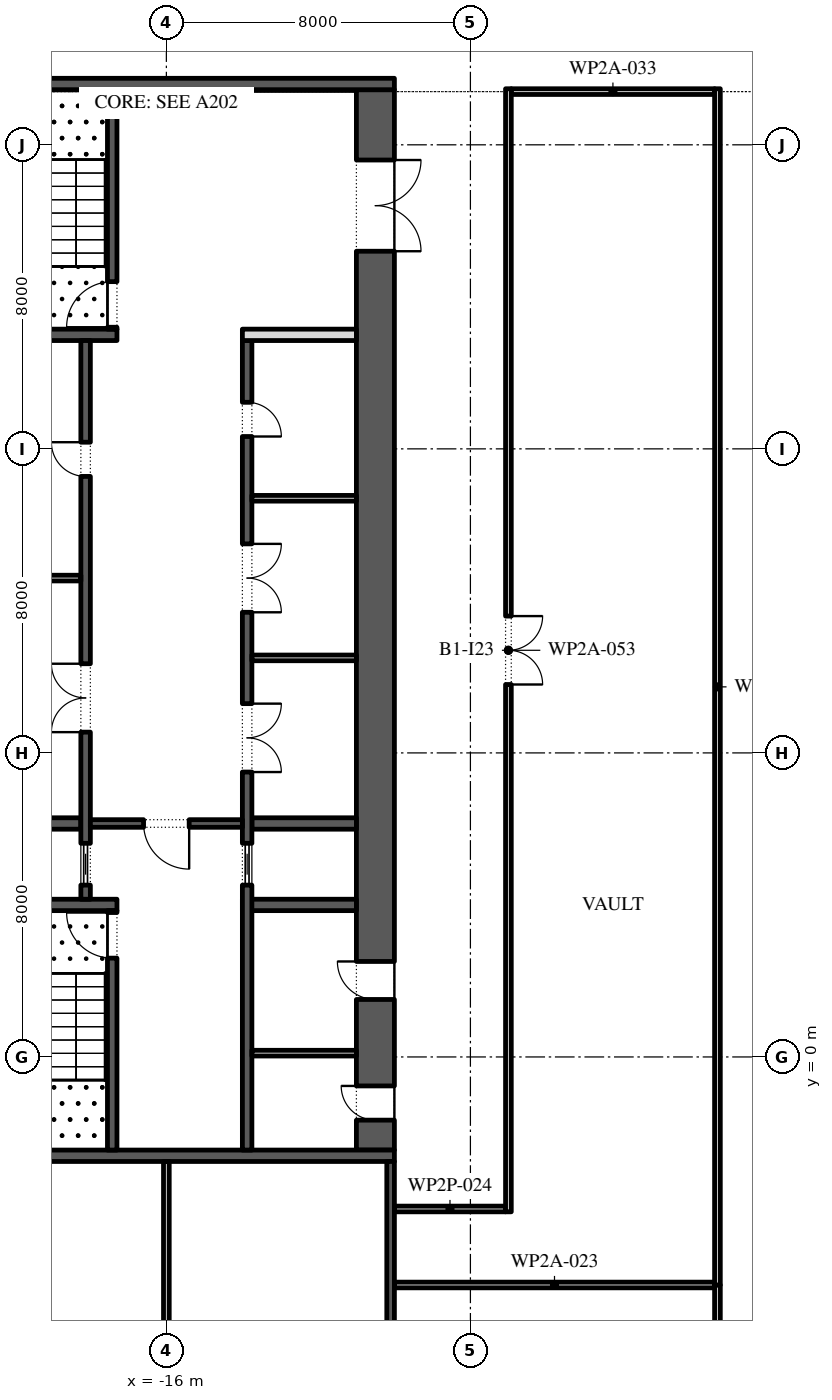
"""IFC4 building model, lengths in metres.
Left out: names, types, materials, properties, quantities, classifications, styles, units other than length and angle.
Written with IfcOpenShell. Run it as: python <this file> out.ifc"""

import sys

from ifc_helpers import new_model, si_unit, direction, frame, frame_2d, origin, place, context, subcontext, project, spatial, rectangle, extrude, element, fill, save


model = new_model("IFC4")
c1 = context("Model", 3, precision=1e-05, world=origin(), true_north=direction((0.0, 1.0)))
c2 = subcontext(c1, "Body", "Model", "MODEL_VIEW")
j1 = project(units=[si_unit("LENGTHUNIT", "METRE"), si_unit("PLANEANGLEUNIT", "RADIAN")], contexts=[c1])
p1 = place(None, origin())
s1 = spatial("IfcSite", under=j1, at=p1, CompositionType="ELEMENT")
p2 = place(p1, origin())
s2 = spatial("IfcBuilding", under=s1, at=p2, CompositionType="ELEMENT")
p3 = place(p2, frame((0.0, 0.0, -5.2)))
s3 = spatial("IfcBuildingStorey", under=s2, at=p3, CompositionType="ELEMENT", Elevation=-5.2)
p4 = place(p3, frame((-10.5, -2.45, 0.0), z_axis=(0.0, 0.0, 1.0), x_axis=(0.0, 1.0, 0.0)))
e1 = element("IfcWall", 1, at=p4, inside=s3, PredefinedType="SHEAR", context=c2, shape_type="SweptSolid", body=[
    extrude(rectangle(XDim=27.9, YDim=1.0, at=frame_2d((13.95, 0.0))), origin(), (0.0, 0.0, 1.0), 4.9),
])
p5 = place(p4, frame((23.65, 0.0, 0.0)))
e2 = element("IfcOpeningElement", 2, at=p5, cuts=e1, PredefinedType="OPENING", context=c2, shape_type="SweptSolid", body=[
    extrude(rectangle(XDim=2.4, YDim=2.1, at=frame_2d((1.2, 1.05))), frame((0.0, 0.51, 0.0), z_axis=(0.0, -1.0, 0.0), x_axis=(1.0, 0.0, 0.0)), (0.0, 0.0, 1.0), 1.02),
])
p6 = place(p4, frame((0.788, 0.0, 0.0)))
e3 = element("IfcOpeningElement", 3, at=p6, cuts=e1, PredefinedType="OPENING", context=c2, shape_type="SweptSolid", body=[
    extrude(rectangle(XDim=0.9, YDim=2.1, at=frame_2d((0.45, 1.05))), frame((0.0, 0.51, 0.0), z_axis=(0.0, -1.0, 0.0), x_axis=(1.0, 0.0, 0.0)), (0.0, 0.0, 1.0), 1.02),
])
p7 = place(p4, frame((3.962, 0.0, 0.0)))
e4 = element("IfcOpeningElement", 4, at=p7, cuts=e1, PredefinedType="OPENING", context=c2, shape_type="SweptSolid", body=[
    extrude(rectangle(XDim=1.0, YDim=2.1, at=frame_2d((0.5, 1.05))), frame((0.0, 0.51, 0.0), z_axis=(0.0, -1.0, 0.0), x_axis=(1.0, 0.0, 0.0)), (0.0, 0.0, 1.0), 1.02),
])
for number, where, z_axis, x_axis in (
    (5, (-22.0, -2.6, 0.0), (0.0, 0.0, 1.0), (1.0, 0.0, 0.0)),
    (6, (-22.0, 25.6, 0.0), (0.0, 0.0, 1.0), (1.0, 0.0, 0.0)),
):
    element("IfcWall", number, at=place(p3, frame(where, z_axis=z_axis, x_axis=x_axis)), inside=s3, PredefinedType="SHEAR", context=c2, shape_type="SweptSolid", body=[
        extrude(rectangle(XDim=12.0, YDim=0.3, at=frame_2d((6.0, 0.0))), origin(), (0.0, 0.0, 1.0), 4.9),
    ])
p8 = place(p3, frame((-21.0, 4.0, 0.0), z_axis=(0.0, 0.0, 1.0), x_axis=(1.0, 0.0, 0.0)))
e7 = element("IfcWall", 7, at=p8, inside=s3, PredefinedType="SHEAR", context=c2, shape_type="SweptSolid", body=[
    extrude(rectangle(XDim=3.7, YDim=0.3, at=frame_2d((1.85, 0.0))), origin(), (0.0, 0.0, 1.0), 4.9),
])
p9 = place(p3, frame((-17.425, -2.45, 0.0), z_axis=(0.0, 0.0, 1.0), x_axis=(0.0, 1.0, 0.0)))
e8 = element("IfcWall", 8, at=p9, inside=s3, PredefinedType="SHEAR", context=c2, shape_type="SweptSolid", body=[
    extrude(rectangle(XDim=6.3, YDim=0.25, at=frame_2d((3.15, 0.0))), origin(), (0.0, 0.0, 1.0), 4.9),
])
p10 = place(p9, frame((5.05, 0.0, 0.0)))
e9 = element("IfcOpeningElement", 9, at=p10, cuts=e8, PredefinedType="OPENING", context=c2, shape_type="SweptSolid", body=[
    extrude(rectangle(XDim=1.2, YDim=2.1, at=frame_2d((0.6, 1.05))), frame((0.0, 0.135, 0.0), z_axis=(0.0, -1.0, 0.0), x_axis=(1.0, 0.0, 0.0)), (0.0, 0.0, 1.0), 0.27),
])
p11 = place(p3, frame((-21.0, 19.0, 0.0), z_axis=(0.0, 0.0, 1.0), x_axis=(1.0, 0.0, 0.0)))
e10 = element("IfcWall", 10, at=p11, inside=s3, PredefinedType="SHEAR", context=c2, shape_type="SweptSolid", body=[
    extrude(rectangle(XDim=3.7, YDim=0.3, at=frame_2d((1.85, 0.0))), origin(), (0.0, 0.0, 1.0), 4.9),
])
p12 = place(p3, frame((-17.425, 19.15, 0.0), z_axis=(0.0, 0.0, 1.0), x_axis=(0.0, 1.0, 0.0)))
e11 = element("IfcWall", 11, at=p12, inside=s3, PredefinedType="SHEAR", context=c2, shape_type="SweptSolid", body=[
    extrude(rectangle(XDim=6.3, YDim=0.25, at=frame_2d((3.15, 0.0))), origin(), (0.0, 0.0, 1.0), 4.9),
])
p13 = place(p12, frame((0.05, 0.0, 0.0)))
e12 = element("IfcOpeningElement", 12, at=p13, cuts=e11, PredefinedType="OPENING", context=c2, shape_type="SweptSolid", body=[
    extrude(rectangle(XDim=1.2, YDim=2.1, at=frame_2d((0.6, 1.05))), frame((0.0, 0.135, 0.0), z_axis=(0.0, -1.0, 0.0), x_axis=(1.0, 0.0, 0.0)), (0.0, 0.0, 1.0), 0.27),
])
p14 = place(p3, frame((-21.0, 6.143, 0.0), z_axis=(0.0, 0.0, 1.0), x_axis=(1.0, 0.0, 0.0)))
e13 = element("IfcWall", 13, at=p14, inside=s3, PredefinedType="SHEAR", context=c2, shape_type="SweptSolid", body=[
    extrude(rectangle(XDim=2.75, YDim=0.3, at=frame_2d((1.375, 0.0))), origin(), (0.0, 0.0, 1.0), 4.9),
])
p15 = place(p3, frame((-18.125, 4.15, 0.0), z_axis=(0.0, 0.0, 1.0), x_axis=(0.0, 1.0, 0.0)))
e14 = element("IfcWall", 14, at=p15, inside=s3, PredefinedType="SHEAR", context=c2, shape_type="SweptSolid", body=[
    extrude(rectangle(XDim=14.7, YDim=0.25, at=frame_2d((7.35, 0.0))), origin(), (0.0, 0.0, 1.0), 4.9),
])
p16 = place(p15, frame((4.396, 0.0, 0.0)))
e15 = element("IfcOpeningElement", 15, at=p16, cuts=e14, PredefinedType="OPENING", context=c2, shape_type="SweptSolid", body=[
    extrude(rectangle(XDim=1.8, YDim=2.4, at=frame_2d((0.9, 1.2))), frame((0.0, 0.135, 0.0), z_axis=(0.0, -1.0, 0.0), x_axis=(1.0, 0.0, 0.0)), (0.0, 0.0, 1.0), 0.27),
])
p17 = place(p15, frame((11.125, 0.0, 0.0)))
e16 = element("IfcOpeningElement", 16, at=p17, cuts=e14, PredefinedType="OPENING", context=c2, shape_type="SweptSolid", body=[
    extrude(rectangle(XDim=0.9, YDim=2.1, at=frame_2d((0.45, 1.05))), frame((0.0, 0.135, 0.0), z_axis=(0.0, -1.0, 0.0), x_axis=(1.0, 0.0, 0.0)), (0.0, 0.0, 1.0), 0.27),
])
p18 = place(p15, frame((0.371, 0.0, 0.0)))
e17 = element("IfcOpeningElement", 17, at=p18, cuts=e14, PredefinedType="OPENING", context=c2, shape_type="SweptSolid", body=[
    extrude(rectangle(XDim=1.1, YDim=2.1, at=frame_2d((0.55, 1.05))), frame((0.0, 0.135, 0.0), z_axis=(0.0, -1.0, 0.0), x_axis=(1.0, 0.0, 0.0)), (0.0, 0.0, 1.0), 0.27),
])
p19 = place(p3, frame((-21.0, 12.6, 0.0), z_axis=(0.0, 0.0, 1.0), x_axis=(1.0, 0.0, 0.0)))
e18 = element("IfcWall", 18, at=p19, inside=s3, PredefinedType="PARTITIONING", context=c2, shape_type="SweptSolid", body=[
    extrude(rectangle(XDim=2.75, YDim=0.15, at=frame_2d((1.375, 0.0))), origin(), (0.0, 0.0, 1.0), 4.9),
])
p20 = place(p3, frame((-14.0, 4.0, 0.0), z_axis=(0.0, 0.0, 1.0), x_axis=(1.0, 0.0, 0.0)))
e19 = element("IfcWall", 19, at=p20, inside=s3, PredefinedType="SHEAR", context=c2, shape_type="SweptSolid", body=[
    extrude(rectangle(XDim=3.0, YDim=0.3, at=frame_2d((1.5, 0.0))), origin(), (0.0, 0.0, 1.0), 4.9),
])
p21 = place(p3, frame((-13.75, 6.143, 0.0), z_axis=(0.0, 0.0, 1.0), x_axis=(1.0, 0.0, 0.0)))
e20 = element("IfcWall", 20, at=p21, inside=s3, PredefinedType="SHEAR", context=c2, shape_type="SweptSolid", body=[
    extrude(rectangle(XDim=2.75, YDim=0.3, at=frame_2d((1.375, 0.0))), origin(), (0.0, 0.0, 1.0), 4.9),
])
p22 = place(p3, frame((-13.875, -2.45, 0.0), z_axis=(0.0, 0.0, 1.0), x_axis=(0.0, 1.0, 0.0)))
e21 = element("IfcWall", 21, at=p22, inside=s3, PredefinedType="SHEAR", context=c2, shape_type="SweptSolid", body=[
    extrude(rectangle(XDim=21.3, YDim=0.25, at=frame_2d((10.65, 0.0))), origin(), (0.0, 0.0, 1.0), 4.9),
])
p23 = place(p22, frame((9.946, 0.0, 0.0)))
e22 = element("IfcOpeningElement", 22, at=p23, cuts=e21, PredefinedType="OPENING", context=c2, shape_type="SweptSolid", body=[
    extrude(rectangle(XDim=1.8, YDim=2.4, at=frame_2d((0.9, 1.2))), frame((0.0, 0.135, 0.0), z_axis=(0.0, -1.0, 0.0), x_axis=(1.0, 0.0, 0.0)), (0.0, 0.0, 1.0), 0.27),
])
p24 = place(p22, frame((14.15, 0.0, 0.0)))
e23 = element("IfcOpeningElement", 23, at=p24, cuts=e21, PredefinedType="OPENING", context=c2, shape_type="SweptSolid", body=[
    extrude(rectangle(XDim=1.8, YDim=2.4, at=frame_2d((0.9, 1.2))), frame((0.0, 0.135, 0.0), z_axis=(0.0, -1.0, 0.0), x_axis=(1.0, 0.0, 0.0)), (0.0, 0.0, 1.0), 0.27),
])
p25 = place(p22, frame((18.775, 0.0, 0.0)))
e24 = element("IfcOpeningElement", 24, at=p25, cuts=e21, PredefinedType="OPENING", context=c2, shape_type="SweptSolid", body=[
    extrude(rectangle(XDim=0.9, YDim=2.1, at=frame_2d((0.45, 1.05))), frame((0.0, 0.135, 0.0), z_axis=(0.0, -1.0, 0.0), x_axis=(1.0, 0.0, 0.0)), (0.0, 0.0, 1.0), 0.27),
])
p26 = place(p22, frame((6.971, 0.0, 0.0)))
e25 = element("IfcOpeningElement", 25, at=p26, cuts=e21, PredefinedType="OPENING", context=c2, shape_type="SweptSolid", body=[
    extrude(rectangle(XDim=1.1, YDim=2.1, at=frame_2d((0.55, 1.05))), frame((0.0, 0.135, 0.0), z_axis=(0.0, -1.0, 0.0), x_axis=(1.0, 0.0, 0.0)), (0.0, 0.0, 1.0), 0.27),
])
p27 = place(p3, frame((-14.0, 19.0, 0.0), z_axis=(0.0, 0.0, 1.0), x_axis=(1.0, 0.0, 0.0)))
e26 = element("IfcWall", 26, at=p27, inside=s3, PredefinedType="PARTITIONING", context=c2, shape_type="SweptSolid", body=[
    extrude(rectangle(XDim=3.0, YDim=0.3, at=frame_2d((1.5, 0.0))), origin(), (0.0, 0.0, 1.0), 4.9),
])
for number, where, z_axis, x_axis in (
    (27, (-13.75, 10.5, 0.0), (0.0, 0.0, 1.0), (1.0, 0.0, 0.0)),
    (28, (-13.75, 14.7, 0.0), (0.0, 0.0, 1.0), (1.0, 0.0, 0.0)),
):
    element("IfcWall", number, at=place(p3, frame(where, z_axis=z_axis, x_axis=x_axis)), inside=s3, PredefinedType="PARTITIONING", context=c2, shape_type="SweptSolid", body=[
        extrude(rectangle(XDim=2.75, YDim=0.15, at=frame_2d((1.375, 0.0))), origin(), (0.0, 0.0, 1.0), 4.9),
    ])
p28 = place(p3, frame((-18.0, 6.143, 0.0), z_axis=(0.0, 0.0, 1.0), x_axis=(1.0, 0.0, 0.0)))
e29 = element("IfcWall", 29, at=p28, inside=s3, PredefinedType="SHEAR", context=c2, shape_type="SweptSolid", body=[
    extrude(rectangle(XDim=4.0, YDim=0.2, at=frame_2d((2.0, 0.0))), origin(), (0.0, 0.0, 1.0), 4.9),
])
p29 = place(p28, frame((1.4, 0.0, 0.0)))
e30 = element("IfcOpeningElement", 30, at=p29, cuts=e29, PredefinedType="OPENING", context=c2, shape_type="SweptSolid", body=[
    extrude(rectangle(XDim=1.2, YDim=2.1, at=frame_2d((0.6, 1.05))), frame((0.0, 0.11, 0.0), z_axis=(0.0, -1.0, 0.0), x_axis=(1.0, 0.0, 0.0)), (0.0, 0.0, 1.0), 0.22),
])
p30 = place(p3, frame((-13.75, 0.1, 0.0), z_axis=(0.0, 0.0, 1.0), x_axis=(1.0, 0.0, 0.0)))
e31 = element("IfcWall", 31, at=p30, inside=s3, PredefinedType="PARTITIONING", context=c2, shape_type="SweptSolid", body=[
    extrude(rectangle(XDim=2.75, YDim=0.15, at=frame_2d((1.375, 0.0))), origin(), (0.0, 0.0, 1.0), 4.9),
])
p31 = place(p3, frame((-10.1, -15.8, 0.0), z_axis=(0.0, 0.0, 1.0), x_axis=(0.0, 1.0, 0.0)))
e32 = element("IfcWall", 32, at=p31, inside=s3, PredefinedType="SHEAR", context=c2, shape_type="SweptSolid", body=[
    extrude(rectangle(XDim=13.05, YDim=0.2, at=frame_2d((6.525, 0.0))), origin(), (0.0, 0.0, 1.0), 4.9),
])
p32 = place(p31, frame((5.625, 0.0, 0.0)))
e33 = element("IfcOpeningElement", 33, at=p32, cuts=e32, PredefinedType="OPENING", context=c2, shape_type="SweptSolid", body=[
    extrude(rectangle(XDim=1.8, YDim=2.4, at=frame_2d((0.9, 1.2))), frame((0.0, 0.11, 0.0), z_axis=(0.0, -1.0, 0.0), x_axis=(1.0, 0.0, 0.0)), (0.0, 0.0, 1.0), 0.22),
])
p33 = place(p3, frame((-16.0, -15.8, 0.0), z_axis=(0.0, 0.0, 1.0), x_axis=(0.0, 1.0, 0.0)))
e34 = element("IfcWall", 34, at=p33, inside=s3, PredefinedType="PARTITIONING", context=c2, shape_type="SweptSolid", body=[
    extrude(rectangle(XDim=13.05, YDim=0.15, at=frame_2d((6.525, 0.0))), origin(), (0.0, 0.0, 1.0), 4.9),
])
p34 = place(p3, frame((-10.0, -6.0, 0.0), z_axis=(0.0, 0.0, 1.0), x_axis=(1.0, 0.0, 0.0)))
e35 = element("IfcWall", 35, at=p34, inside=s3, PredefinedType="PARTITIONING", context=c2, shape_type="SweptSolid", body=[
    extrude(rectangle(XDim=8.425, YDim=0.15, at=frame_2d((4.212, 0.0))), origin(), (0.0, 0.0, 1.0), 4.9),
])
p35 = place(p3, frame((-10.0, -4.0, 0.0), z_axis=(0.0, 0.0, 1.0), x_axis=(1.0, 0.0, 0.0)))
e36 = element("IfcWall", 36, at=p35, inside=s3, PredefinedType="PARTITIONING", context=c2, shape_type="SweptSolid", body=[
    extrude(rectangle(XDim=2.925, YDim=0.15, at=frame_2d((1.462, 0.0))), origin(), (0.0, 0.0, 1.0), 3.93),
])
p36 = place(p3, frame((-6.925, 25.4, 0.0), z_axis=(0.0, 0.0, 1.0), x_axis=(1.0, 0.0, 0.0)))
e37 = element("IfcWall", 37, at=p36, inside=s3, PredefinedType="PARTITIONING", context=c2, shape_type="SweptSolid", body=[
    extrude(rectangle(XDim=5.35, YDim=0.15, at=frame_2d((2.675, 0.0))), origin(), (0.0, 0.0, 1.0), 4.9),
])
p37 = place(p3, frame((-7.0, -4.075, 0.0), z_axis=(0.0, 0.0, 1.0), x_axis=(0.0, 1.0, 0.0)))
e38 = element("IfcWall", 38, at=p37, inside=s3, PredefinedType="PARTITIONING", context=c2, shape_type="SweptSolid", body=[
    extrude(rectangle(XDim=29.55, YDim=0.15, at=frame_2d((14.775, 0.0))), origin(), (0.0, 0.0, 1.0), 4.9),
])
p38 = place(p37, frame((13.875, 0.0, 0.0)))
e39 = element("IfcOpeningElement", 39, at=p38, cuts=e38, PredefinedType="OPENING", context=c2, shape_type="SweptSolid", body=[
    extrude(rectangle(XDim=1.8, YDim=2.1, at=frame_2d((0.9, 1.05))), frame((0.0, 0.085, 0.0), z_axis=(0.0, -1.0, 0.0), x_axis=(1.0, 0.0, 0.0)), (0.0, 0.0, 1.0), 0.17),
])
p39 = place(p3, frame((-1.5, -19.0, 0.0), z_axis=(0.0, 0.0, 1.0), x_axis=(0.0, 1.0, 0.0)))
e40 = element("IfcWall", 40, at=p39, inside=s3, PredefinedType="PARTITIONING", context=c2, shape_type="SweptSolid", body=[
    extrude(rectangle(XDim=13.0, YDim=0.15, at=frame_2d((6.5, 0.0))), origin(), (0.0, 0.0, 1.0), 4.9),
])
p40 = place(p39, frame((6.0, 0.0, 0.0)))
e41 = element("IfcOpeningElement", 41, at=p40, cuts=e40, PredefinedType="OPENING", context=c2, shape_type="SweptSolid", body=[
    extrude(rectangle(XDim=1.0, YDim=2.1, at=frame_2d((0.5, 1.05))), frame((0.0, 0.085, 0.0), z_axis=(0.0, -1.0, 0.0), x_axis=(1.0, 0.0, 0.0)), (0.0, 0.0, 1.0), 0.17),
])
p41 = place(p3, frame((-1.5, -6.0, 0.0), z_axis=(0.0, 0.0, 1.0), x_axis=(0.0, 1.0, 0.0)))
e42 = element("IfcWall", 42, at=p41, inside=s3, PredefinedType="PARTITIONING", context=c2, shape_type="SweptSolid", body=[
    extrude(rectangle(XDim=31.475, YDim=0.15, at=frame_2d((15.738, 0.0))), origin(), (0.0, 0.0, 1.0), 4.9),
])
p42 = place(p16, origin())
e43 = element("IfcDoor", 43, at=p42, inside=s3, OperationType="DOUBLE_DOOR_SINGLE_SWING", PredefinedType="DOOR", context=c2, shape_type="SweptSolid", body=[
    extrude(rectangle(XDim=1.8, YDim=2.4, at=frame_2d((0.9, 1.2))), frame((0.0, 0.125, 0.0), z_axis=(0.0, -1.0, 0.0), x_axis=(1.0, 0.0, 0.0)), (0.0, 0.0, 1.0), 0.05),
])
fill(e15, e43)
p43 = place(p17, origin())
e44 = element("IfcDoor", 44, at=p43, inside=s3, OperationType="SINGLE_SWING_LEFT", PredefinedType="DOOR", context=c2, shape_type="SweptSolid", body=[
    extrude(rectangle(XDim=0.9, YDim=2.1, at=frame_2d((0.45, 1.05))), frame((0.0, 0.125, 0.0), z_axis=(0.0, -1.0, 0.0), x_axis=(1.0, 0.0, 0.0)), (0.0, 0.0, 1.0), 0.05),
])
fill(e16, e44)
p44 = place(p18, origin())
e45 = element("IfcDoor", 45, at=p44, inside=s3, OperationType="SLIDING_TO_LEFT", PredefinedType="DOOR", context=c2, shape_type="SweptSolid", body=[
    extrude(rectangle(XDim=1.1, YDim=2.1, at=frame_2d((0.55, 1.05))), frame((0.0, 0.025, 0.0), z_axis=(0.0, -1.0, 0.0), x_axis=(1.0, 0.0, 0.0)), (0.0, 0.0, 1.0), 0.05),
])
fill(e17, e45)
p45 = place(p23, frame((1.8, -0.2, 0.0), z_axis=(0.0, 0.0, 1.0), x_axis=(-1.0, 0.0, 0.0)))
e46 = element("IfcDoor", 46, at=p45, inside=s3, OperationType="DOUBLE_DOOR_SINGLE_SWING", PredefinedType="DOOR", context=c2, shape_type="SweptSolid", body=[
    extrude(rectangle(XDim=1.8, YDim=2.4, at=frame_2d((0.9, 1.2))), frame((0.0, -0.075, 0.0), z_axis=(0.0, -1.0, 0.0), x_axis=(1.0, 0.0, 0.0)), (0.0, 0.0, 1.0), 0.05),
])
fill(e22, e46)
p46 = place(p24, frame((1.8, -0.2, 0.0), z_axis=(0.0, 0.0, 1.0), x_axis=(-1.0, 0.0, 0.0)))
e47 = element("IfcDoor", 47, at=p46, inside=s3, OperationType="DOUBLE_DOOR_SINGLE_SWING", PredefinedType="DOOR", context=c2, shape_type="SweptSolid", body=[
    extrude(rectangle(XDim=1.8, YDim=2.4, at=frame_2d((0.9, 1.2))), frame((0.0, -0.075, 0.0), z_axis=(0.0, -1.0, 0.0), x_axis=(1.0, 0.0, 0.0)), (0.0, 0.0, 1.0), 0.05),
])
fill(e23, e47)
p47 = place(p25, frame((0.9, -0.2, 0.0), z_axis=(0.0, 0.0, 1.0), x_axis=(-1.0, 0.0, 0.0)))
e48 = element("IfcDoor", 48, at=p47, inside=s3, OperationType="SINGLE_SWING_LEFT", PredefinedType="DOOR", context=c2, shape_type="SweptSolid", body=[
    extrude(rectangle(XDim=0.9, YDim=2.1, at=frame_2d((0.45, 1.05))), frame((0.0, -0.075, 0.0), z_axis=(0.0, -1.0, 0.0), x_axis=(1.0, 0.0, 0.0)), (0.0, 0.0, 1.0), 0.05),
])
fill(e24, e48)
p48 = place(p26, origin())
e49 = element("IfcDoor", 49, at=p48, inside=s3, OperationType="SLIDING_TO_LEFT", PredefinedType="DOOR", context=c2, shape_type="SweptSolid", body=[
    extrude(rectangle(XDim=1.1, YDim=2.1, at=frame_2d((0.55, 1.05))), frame((0.0, 0.025, 0.0), z_axis=(0.0, -1.0, 0.0), x_axis=(1.0, 0.0, 0.0)), (0.0, 0.0, 1.0), 0.05),
])
fill(e25, e49)
p49 = place(p29, frame((1.2, 0.0, 0.0), z_axis=(0.0, 0.0, 1.0), x_axis=(-1.0, 0.0, 0.0)))
e50 = element("IfcDoor", 50, at=p49, inside=s3, OperationType="SINGLE_SWING_RIGHT", PredefinedType="DOOR", context=c2, shape_type="SweptSolid", body=[
    extrude(rectangle(XDim=1.2, YDim=2.1, at=frame_2d((0.6, 1.05))), frame((0.0, 0.025, 0.0), z_axis=(0.0, -1.0, 0.0), x_axis=(1.0, 0.0, 0.0)), (0.0, 0.0, 1.0), 0.05),
])
fill(e30, e50)
p50 = place(p5, frame((2.4, 0.0, 0.0), z_axis=(0.0, 0.0, 1.0), x_axis=(-1.0, 0.0, 0.0)))
e51 = element("IfcDoor", 51, at=p50, inside=s3, OperationType="DOUBLE_DOOR_SINGLE_SWING", PredefinedType="DOOR", context=c2, shape_type="SweptSolid", body=[
    extrude(rectangle(XDim=2.4, YDim=2.1, at=frame_2d((1.2, 1.05))), frame((0.0, 0.025, 0.0), z_axis=(0.0, -1.0, 0.0), x_axis=(1.0, 0.0, 0.0)), (0.0, 0.0, 1.0), 0.05),
])
fill(e2, e51)
p51 = place(p10, origin())
e52 = element("IfcDoor", 52, at=p51, inside=s3, OperationType="SINGLE_SWING_LEFT", PredefinedType="DOOR", context=c2, shape_type="SweptSolid", body=[
    extrude(rectangle(XDim=1.2, YDim=2.1, at=frame_2d((0.6, 1.05))), frame((0.0, 0.025, 0.0), z_axis=(0.0, -1.0, 0.0), x_axis=(1.0, 0.0, 0.0)), (0.0, 0.0, 1.0), 0.05),
])
fill(e9, e52)
p52 = place(p13, origin())
e53 = element("IfcDoor", 53, at=p52, inside=s3, OperationType="SINGLE_SWING_RIGHT", PredefinedType="DOOR", context=c2, shape_type="SweptSolid", body=[
    extrude(rectangle(XDim=1.2, YDim=2.1, at=frame_2d((0.6, 1.05))), frame((0.0, 0.025, 0.0), z_axis=(0.0, -1.0, 0.0), x_axis=(1.0, 0.0, 0.0)), (0.0, 0.0, 1.0), 0.05),
])
fill(e12, e53)
p53 = place(p6, origin())
e54 = element("IfcDoor", 54, at=p53, inside=s3, OperationType="SINGLE_SWING_LEFT", PredefinedType="DOOR", context=c2, shape_type="SweptSolid", body=[
    extrude(rectangle(XDim=0.9, YDim=2.1, at=frame_2d((0.45, 1.05))), frame((0.0, 0.5, 0.0), z_axis=(0.0, -1.0, 0.0), x_axis=(1.0, 0.0, 0.0)), (0.0, 0.0, 1.0), 0.05),
])
fill(e3, e54)
p54 = place(p7, origin())
e55 = element("IfcDoor", 55, at=p54, inside=s3, OperationType="SINGLE_SWING_LEFT", PredefinedType="DOOR", context=c2, shape_type="SweptSolid", body=[
    extrude(rectangle(XDim=1.0, YDim=2.1, at=frame_2d((0.5, 1.05))), frame((0.0, 0.5, 0.0), z_axis=(0.0, -1.0, 0.0), x_axis=(1.0, 0.0, 0.0)), (0.0, 0.0, 1.0), 0.05),
])
fill(e4, e55)
p55 = place(p38, frame((1.8, 0.0, 0.0), z_axis=(0.0, 0.0, 1.0), x_axis=(-1.0, 0.0, 0.0)))
e56 = element("IfcDoor", 56, at=p55, inside=s3, OperationType="SINGLE_SWING_RIGHT", PredefinedType="DOOR", context=c2, shape_type="SweptSolid", body=[
    extrude(rectangle(XDim=1.8, YDim=2.1, at=frame_2d((0.9, 1.05))), frame((0.0, 0.025, 0.0), z_axis=(0.0, -1.0, 0.0), x_axis=(1.0, 0.0, 0.0)), (0.0, 0.0, 1.0), 0.05),
])
fill(e39, e56)
save(model, sys.argv[1])
